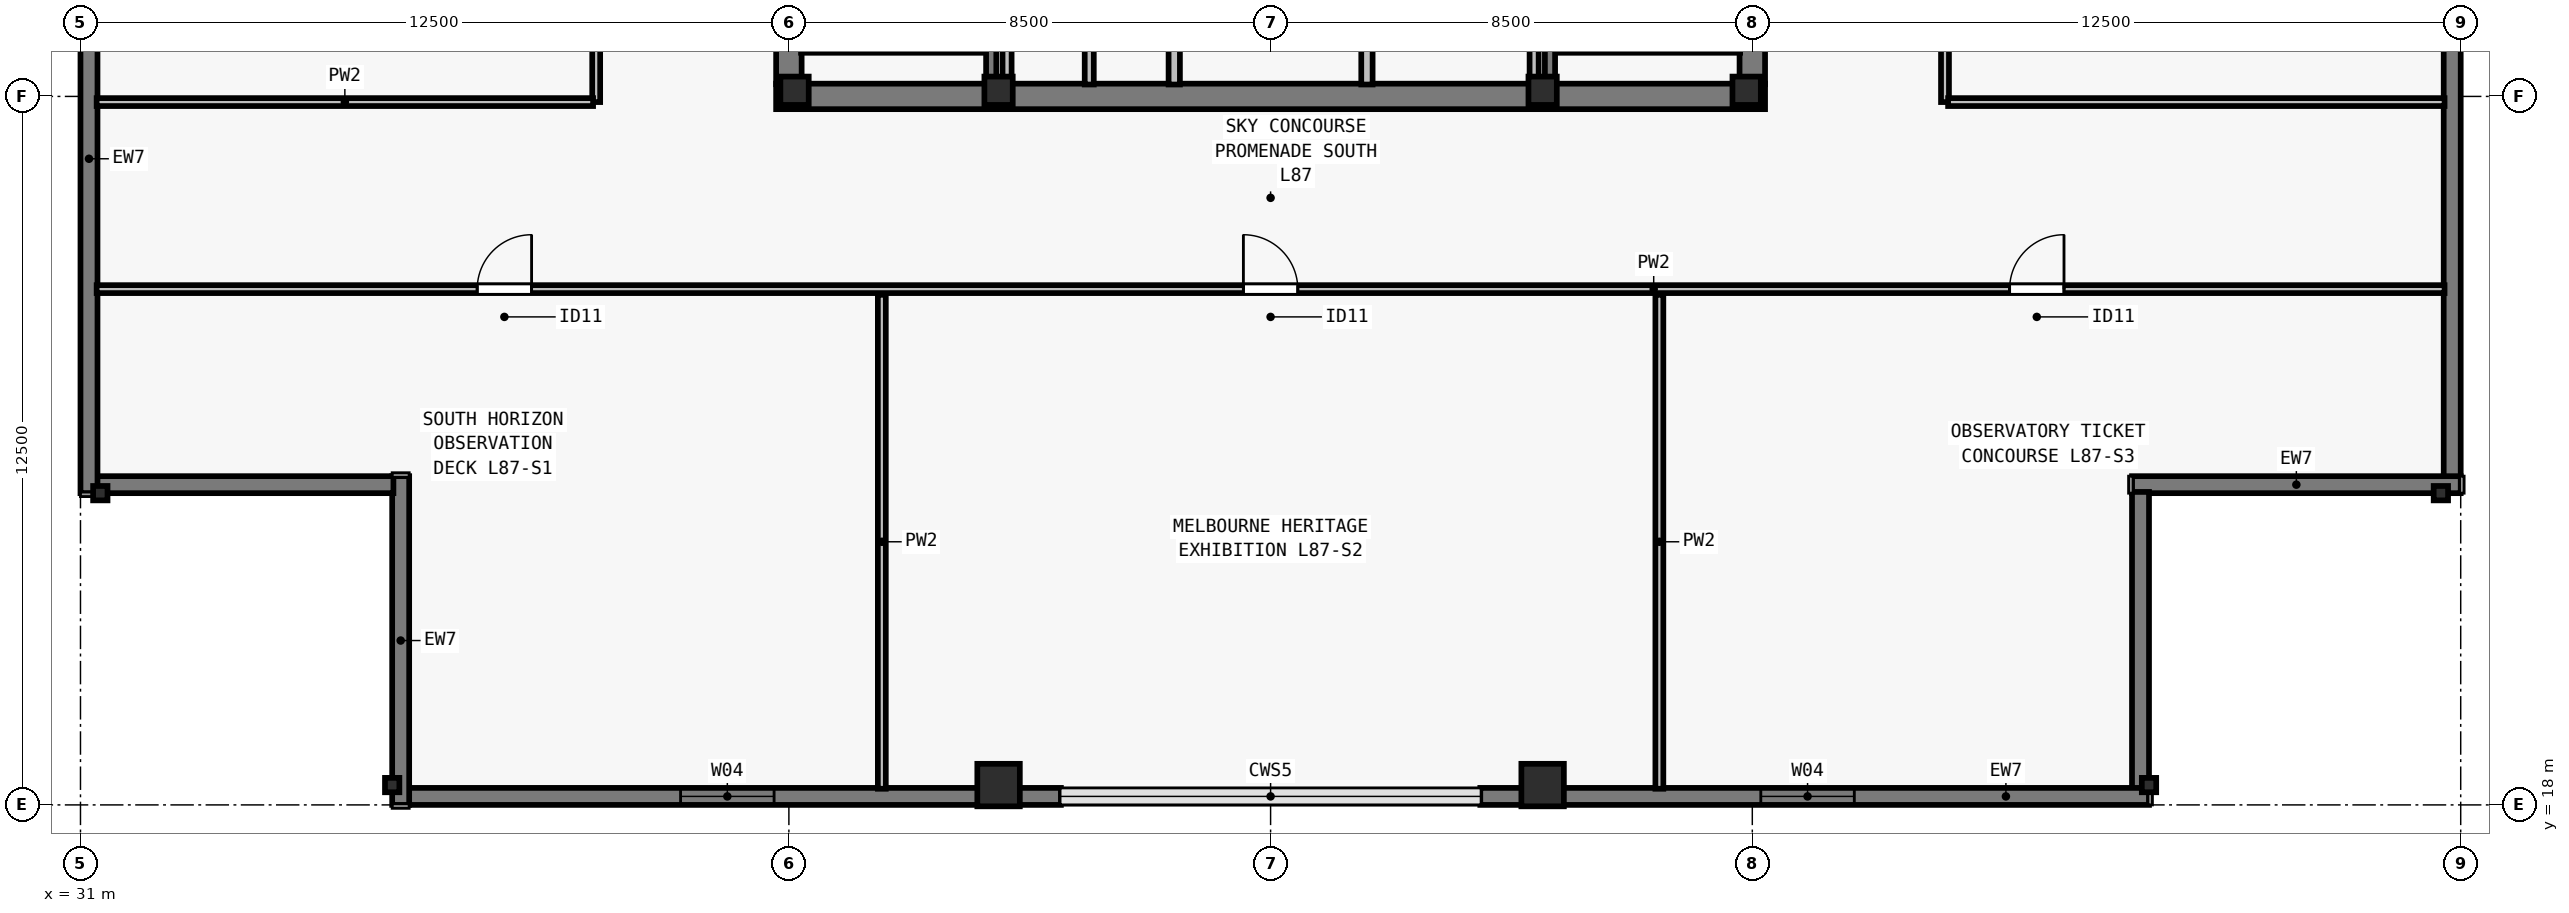
"""IFC4 building model, lengths in metres.
Left out: names, types, materials, properties, quantities, classifications, styles, units other than length and angle.
Written with IfcOpenShell. Run it as: python <this file> out.ifc"""

import sys

from ifc_helpers import new_model, si_unit, direction, frame, frame_2d, origin, origin_2d, place, context, subcontext, project, spatial, rectangle, i_section, extrude, element, fill, save


model = new_model("IFC4")
c1 = context("Model", 3, precision=1e-05, world=origin(), true_north=direction((0.0, 1.0)))
c2 = subcontext(c1, "Body", "Model", "MODEL_VIEW")
j1 = project(units=[si_unit("LENGTHUNIT", "METRE"), si_unit("PLANEANGLEUNIT", "RADIAN")], contexts=[c1])
p1 = place(None, origin())
s1 = spatial("IfcSite", under=j1, at=p1, CompositionType="ELEMENT")
p2 = place(p1, origin())
s2 = spatial("IfcBuilding", under=s1, at=p2, CompositionType="ELEMENT")
p3 = place(p2, frame((0.0, 0.0, 315.5)))
s3 = spatial("IfcBuildingStorey", under=s2, at=p3, CompositionType="ELEMENT", Elevation=315.5)
for number, where, z_axis, x_axis in (
    (1, (43.6, 30.6, 0.0), (0.0, 0.0, 1.0), (1.0, 0.0, 0.0)),
    (2, (47.2, 30.6, 0.0), (0.0, 0.0, 1.0), (1.0, 0.0, 0.0)),
    (3, (56.8, 30.6, 0.0), (0.0, 0.0, 1.0), (1.0, 0.0, 0.0)),
    (4, (60.4, 30.6, 0.0), (0.0, 0.0, 1.0), (1.0, 0.0, 0.0)),
):
    element("IfcColumn", number, at=place(p3, frame(where, z_axis=z_axis, x_axis=x_axis)), inside=s3, PredefinedType="COLUMN", context=c2, shape_type="SweptSolid", body=[
        extrude(i_section(OverallWidth=0.5, OverallDepth=0.5, WebThickness=0.028, FlangeThickness=0.045, at=origin_2d()), origin(), (0.0, 0.0, 1.0), 4.5),
    ])
p4 = place(p3, frame((36.5, 18.35, 0.0), z_axis=(0.0, 0.0, 1.0), x_axis=(1.0, 0.0, 0.0)))
e5 = element("IfcColumn", 5, at=p4, inside=s3, PredefinedType="COLUMN", context=c2, shape_type="SweptSolid", body=[
    extrude(i_section(OverallWidth=0.254, OverallDepth=0.254, WebThickness=0.009, FlangeThickness=0.014, FilletRadius=0.013, at=origin_2d()), origin(), (0.0, 0.0, 1.0), 4.5),
])
for number, where, z_axis, x_axis in (
    (6, (47.2, 18.35, 0.0), (0.0, 0.0, 1.0), (1.0, 0.0, 0.0)),
    (7, (56.8, 18.35, 0.0), (0.0, 0.0, 1.0), (1.0, 0.0, 0.0)),
):
    element("IfcColumn", number, at=place(p3, frame(where, z_axis=z_axis, x_axis=x_axis)), inside=s3, PredefinedType="COLUMN", context=c2, shape_type="SweptSolid", body=[
        extrude(rectangle(XDim=0.75, YDim=0.75, at=origin_2d()), origin(), (0.0, 0.0, 1.0), 4.5),
    ])
for number, where, z_axis, x_axis in (
    (8, (67.5, 18.35, 0.0), (0.0, 0.0, 1.0), (1.0, 0.0, 0.0)),
    (9, (72.65, 23.5, 0.0), (0.0, 0.0, 1.0), (0.0, 1.0, 0.0)),
    (10, (31.35, 23.5, 0.0), (0.0, 0.0, 1.0), (0.0, 1.0, 0.0)),
):
    element("IfcColumn", number, at=place(p3, frame(where, z_axis=z_axis, x_axis=x_axis)), inside=s3, PredefinedType="COLUMN", context=c2, shape_type="SweptSolid", body=[
        extrude(i_section(OverallWidth=0.254, OverallDepth=0.254, WebThickness=0.009, FlangeThickness=0.014, FilletRadius=0.013, at=origin_2d()), origin(), (0.0, 0.0, 1.0), 4.5),
    ])
p5 = place(p3, frame((72.85, 35.3, 0.0), z_axis=(0.0, 0.0, 1.0), x_axis=(0.0, -1.0, 0.0)))
e11 = element("IfcWall", 11, at=p5, inside=s3, PredefinedType="SOLIDWALL", context=c2, shape_type="SweptSolid", body=[
    extrude(rectangle(XDim=11.522, YDim=0.3, at=frame_2d((5.761, 0.0))), origin(), (0.0, 0.0, 1.0), 4.29),
])
p6 = place(p3, frame((73.0, 23.65, 0.0), z_axis=(0.0, 0.0, 1.0), x_axis=(-1.0, 0.0, 0.0)))
e12 = element("IfcWall", 12, at=p6, inside=s3, PredefinedType="SOLIDWALL", context=c2, shape_type="SweptSolid", body=[
    extrude(rectangle(XDim=5.8, YDim=0.3, at=frame_2d((2.9, 0.0))), origin(), (0.0, 0.0, 1.0), 4.29),
])
p7 = place(p3, frame((67.35, 23.522, 0.0), z_axis=(0.0, 0.0, 1.0), x_axis=(0.0, -1.0, 0.0)))
e13 = element("IfcWall", 13, at=p7, inside=s3, PredefinedType="SOLIDWALL", context=c2, shape_type="SweptSolid", body=[
    extrude(rectangle(XDim=5.244, YDim=0.3, at=frame_2d((2.622, 0.0))), origin(), (0.0, 0.0, 1.0), 4.29),
])
p8 = place(p3, frame((67.5, 18.15, 0.0), z_axis=(0.0, 0.0, 1.0), x_axis=(-1.0, 0.0, 0.0)))
e14 = element("IfcWall", 14, at=p8, inside=s3, PredefinedType="SOLIDWALL", context=c2, shape_type="SweptSolid", body=[
    extrude(rectangle(XDim=11.8, YDim=0.3, at=frame_2d((5.9, 0.0))), origin(), (0.0, 0.0, 1.0), 4.29),
])
p9 = place(p8, frame((5.2, 0.0, 0.8)))
e15 = element("IfcOpeningElement", 15, at=p9, cuts=e14, PredefinedType="OPENING", context=c2, shape_type="SweptSolid", body=[
    extrude(rectangle(XDim=1.65, YDim=1.85, at=frame_2d((0.825, 0.925))), frame((0.0, 0.16, 0.0), z_axis=(0.0, -1.0, 0.0), x_axis=(1.0, 0.0, 0.0)), (0.0, 0.0, 1.0), 0.32),
])
p10 = place(p3, frame((48.3, 18.15, 0.0), z_axis=(0.0, 0.0, 1.0), x_axis=(-1.0, 0.0, 0.0)))
e16 = element("IfcWall", 16, at=p10, inside=s3, PredefinedType="SOLIDWALL", context=c2, shape_type="SweptSolid", body=[
    extrude(rectangle(XDim=11.522, YDim=0.3, at=frame_2d((5.761, 0.0))), origin(), (0.0, 0.0, 1.0), 4.29),
])
p11 = place(p10, frame((5.061, 0.0, 0.8)))
e17 = element("IfcOpeningElement", 17, at=p11, cuts=e16, PredefinedType="OPENING", context=c2, shape_type="SweptSolid", body=[
    extrude(rectangle(XDim=1.65, YDim=1.85, at=frame_2d((0.825, 0.925))), frame((0.0, 0.16, 0.0), z_axis=(0.0, -1.0, 0.0), x_axis=(1.0, 0.0, 0.0)), (0.0, 0.0, 1.0), 0.32),
])
p12 = place(p3, frame((36.65, 18.0, 0.0), z_axis=(0.0, 0.0, 1.0), x_axis=(0.0, 1.0, 0.0)))
e18 = element("IfcWall", 18, at=p12, inside=s3, PredefinedType="SOLIDWALL", context=c2, shape_type="SweptSolid", body=[
    extrude(rectangle(XDim=5.8, YDim=0.3, at=frame_2d((2.9, 0.0))), origin(), (0.0, 0.0, 1.0), 4.29),
])
p13 = place(p3, frame((36.522, 23.65, 0.0), z_axis=(0.0, 0.0, 1.0), x_axis=(-1.0, 0.0, 0.0)))
e19 = element("IfcWall", 19, at=p13, inside=s3, PredefinedType="SOLIDWALL", context=c2, shape_type="SweptSolid", body=[
    extrude(rectangle(XDim=5.244, YDim=0.3, at=frame_2d((2.622, 0.0))), origin(), (0.0, 0.0, 1.0), 4.29),
])
p14 = place(p3, frame((31.15, 23.5, 0.0), z_axis=(0.0, 0.0, 1.0), x_axis=(0.0, 1.0, 0.0)))
e20 = element("IfcWall", 20, at=p14, inside=s3, PredefinedType="SOLIDWALL", context=c2, shape_type="SweptSolid", body=[
    extrude(rectangle(XDim=11.8, YDim=0.3, at=frame_2d((5.9, 0.0))), origin(), (0.0, 0.0, 1.0), 4.29),
])
p15 = place(p3, frame((43.275, 30.5, 0.0), z_axis=(0.0, 0.0, 1.0), x_axis=(1.0, 0.0, 0.0)))
e21 = element("IfcWall", 21, at=p15, inside=s3, PredefinedType="SHEAR", context=c2, shape_type="SweptSolid", body=[
    extrude(rectangle(XDim=17.45, YDim=0.45, at=frame_2d((8.725, 0.0))), origin(), (0.0, 0.0, 1.0), 4.29),
])
for number, where, z_axis, x_axis in (
    (22, (43.5, 30.715, 0.0), (0.0, 0.0, 1.0), (0.0, 1.0, 0.0)),
    (23, (60.5, 30.715, 0.0), (0.0, 0.0, 1.0), (0.0, 1.0, 0.0)),
):
    element("IfcWall", number, at=place(p3, frame(where, z_axis=z_axis, x_axis=x_axis)), inside=s3, PredefinedType="SHEAR", context=c2, shape_type="SweptSolid", body=[
        extrude(rectangle(XDim=8.035, YDim=0.45, at=frame_2d((4.018, 0.0))), origin(), (0.0, 0.0, 1.0), 4.29),
    ])
p16 = place(p3, frame((50.3, 30.71, 0.0), z_axis=(0.0, 0.0, 1.0), x_axis=(0.0, 1.0, 0.0)))
e24 = element("IfcWall", 24, at=p16, inside=s3, PredefinedType="SOLIDWALL", context=c2, shape_type="SweptSolid", body=[
    extrude(rectangle(XDim=7.905, YDim=0.2, at=frame_2d((3.953, 0.0))), origin(), (0.0, 0.0, 1.0), 4.29),
])
p17 = place(p16, frame((2.14, 0.0, 0.0)))
e25 = element("IfcOpeningElement", 25, at=p17, cuts=e24, PredefinedType="OPENING", context=c2, shape_type="SweptSolid", body=[
    extrude(rectangle(XDim=0.95, YDim=2.12, at=frame_2d((0.475, 1.06))), frame((0.0, 0.11, 0.0), z_axis=(0.0, -1.0, 0.0), x_axis=(1.0, 0.0, 0.0)), (0.0, 0.0, 1.0), 0.22),
])
p18 = place(p3, frame((53.7, 30.71, 0.0), z_axis=(0.0, 0.0, 1.0), x_axis=(0.0, 1.0, 0.0)))
e26 = element("IfcWall", 26, at=p18, inside=s3, PredefinedType="SOLIDWALL", context=c2, shape_type="SweptSolid", body=[
    extrude(rectangle(XDim=7.905, YDim=0.2, at=frame_2d((3.953, 0.0))), origin(), (0.0, 0.0, 1.0), 4.29),
])
p19 = place(p18, frame((1.39, 0.0, 0.0)))
e27 = element("IfcOpeningElement", 27, at=p19, cuts=e26, PredefinedType="OPENING", context=c2, shape_type="SweptSolid", body=[
    extrude(rectangle(XDim=0.95, YDim=2.12, at=frame_2d((0.475, 1.06))), frame((0.0, 0.11, 0.0), z_axis=(0.0, -1.0, 0.0), x_axis=(1.0, 0.0, 0.0)), (0.0, 0.0, 1.0), 0.22),
])
p20 = place(p18, frame((5.39, 0.0, 0.0)))
e28 = element("IfcOpeningElement", 28, at=p20, cuts=e26, PredefinedType="OPENING", context=c2, shape_type="SweptSolid", body=[
    extrude(rectangle(XDim=0.85, YDim=2.12, at=frame_2d((0.425, 1.06))), frame((0.0, 0.11, 0.0), z_axis=(0.0, -1.0, 0.0), x_axis=(1.0, 0.0, 0.0)), (0.0, 0.0, 1.0), 0.22),
])
p21 = place(p3, frame((47.35, 30.71, 0.0), z_axis=(0.0, 0.0, 1.0), x_axis=(0.0, 1.0, 0.0)))
e29 = element("IfcWall", 29, at=p21, inside=s3, PredefinedType="PARTITIONING", context=c2, shape_type="SweptSolid", body=[
    extrude(rectangle(XDim=7.905, YDim=0.16, at=frame_2d((3.953, 0.0))), origin(), (0.0, 0.0, 1.0), 4.29),
])
p22 = place(p3, frame((48.8, 30.71, 0.0), z_axis=(0.0, 0.0, 1.0), x_axis=(0.0, 1.0, 0.0)))
e30 = element("IfcWall", 30, at=p22, inside=s3, PredefinedType="PARTITIONING", context=c2, shape_type="SweptSolid", body=[
    extrude(rectangle(XDim=7.905, YDim=0.16, at=frame_2d((3.953, 0.0))), origin(), (0.0, 0.0, 1.0), 4.29),
])
p23 = place(p22, frame((3.54, 0.0, 0.0)))
e31 = element("IfcOpeningElement", 31, at=p23, cuts=e30, PredefinedType="OPENING", context=c2, shape_type="SweptSolid", body=[
    extrude(rectangle(XDim=0.85, YDim=2.12, at=frame_2d((0.425, 1.06))), frame((0.0, 0.09, 0.0), z_axis=(0.0, -1.0, 0.0), x_axis=(1.0, 0.0, 0.0)), (0.0, 0.0, 1.0), 0.18),
])
p24 = place(p3, frame((56.65, 30.71, 0.0), z_axis=(0.0, 0.0, 1.0), x_axis=(0.0, 1.0, 0.0)))
e32 = element("IfcWall", 32, at=p24, inside=s3, PredefinedType="PARTITIONING", context=c2, shape_type="SweptSolid", body=[
    extrude(rectangle(XDim=7.905, YDim=0.16, at=frame_2d((3.953, 0.0))), origin(), (0.0, 0.0, 1.0), 4.29),
])
p25 = place(p3, frame((31.285, 27.1, 0.0), z_axis=(0.0, 0.0, 1.0), x_axis=(1.0, 0.0, 0.0)))
e33 = element("IfcWall", 33, at=p25, inside=s3, PredefinedType="PARTITIONING", context=c2, shape_type="SweptSolid", body=[
    extrude(rectangle(XDim=41.43, YDim=0.14, at=frame_2d((20.715, 0.0))), origin(), (0.0, 0.0, 1.0), 4.009),
])
p26 = place(p25, frame((6.715, 0.0, 0.0)))
e34 = element("IfcOpeningElement", 34, at=p26, cuts=e33, PredefinedType="OPENING", context=c2, shape_type="SweptSolid", body=[
    extrude(rectangle(XDim=0.96, YDim=2.12, at=frame_2d((0.48, 1.06))), frame((0.0, 0.08, 0.0), z_axis=(0.0, -1.0, 0.0), x_axis=(1.0, 0.0, 0.0)), (0.0, 0.0, 1.0), 0.16),
])
p27 = place(p25, frame((20.235, 0.0, 0.0)))
e35 = element("IfcOpeningElement", 35, at=p27, cuts=e33, PredefinedType="OPENING", context=c2, shape_type="SweptSolid", body=[
    extrude(rectangle(XDim=0.96, YDim=2.12, at=frame_2d((0.48, 1.06))), frame((0.0, 0.08, 0.0), z_axis=(0.0, -1.0, 0.0), x_axis=(1.0, 0.0, 0.0)), (0.0, 0.0, 1.0), 0.16),
])
p28 = place(p25, frame((33.755, 0.0, 0.0)))
e36 = element("IfcOpeningElement", 36, at=p28, cuts=e33, PredefinedType="OPENING", context=c2, shape_type="SweptSolid", body=[
    extrude(rectangle(XDim=0.96, YDim=2.12, at=frame_2d((0.48, 1.06))), frame((0.0, 0.08, 0.0), z_axis=(0.0, -1.0, 0.0), x_axis=(1.0, 0.0, 0.0)), (0.0, 0.0, 1.0), 0.16),
])
p29 = place(p3, frame((40.1, 30.4, 0.0), z_axis=(0.0, 0.0, 1.0), x_axis=(0.0, 1.0, 0.0)))
e37 = element("IfcWall", 37, at=p29, inside=s3, PredefinedType="PARTITIONING", context=c2, shape_type="SweptSolid", body=[
    extrude(rectangle(XDim=17.2, YDim=0.14, at=frame_2d((8.6, 0.0))), origin(), (0.0, 0.0, 1.0), 4.009),
])
p30 = place(p29, frame((3.772, 0.0, 0.0)))
e38 = element("IfcOpeningElement", 38, at=p30, cuts=e37, PredefinedType="OPENING", context=c2, shape_type="SweptSolid", body=[
    extrude(rectangle(XDim=0.96, YDim=2.12, at=frame_2d((0.48, 1.06))), frame((0.0, 0.08, 0.0), z_axis=(0.0, -1.0, 0.0), x_axis=(1.0, 0.0, 0.0)), (0.0, 0.0, 1.0), 0.16),
])
p31 = place(p29, frame((12.272, 0.0, 0.0)))
e39 = element("IfcOpeningElement", 39, at=p31, cuts=e37, PredefinedType="OPENING", context=c2, shape_type="SweptSolid", body=[
    extrude(rectangle(XDim=0.96, YDim=2.12, at=frame_2d((0.48, 1.06))), frame((0.0, 0.08, 0.0), z_axis=(0.0, -1.0, 0.0), x_axis=(1.0, 0.0, 0.0)), (0.0, 0.0, 1.0), 0.16),
])
p32 = place(p3, frame((63.9, 30.4, 0.0), z_axis=(0.0, 0.0, 1.0), x_axis=(0.0, 1.0, 0.0)))
e40 = element("IfcWall", 40, at=p32, inside=s3, PredefinedType="PARTITIONING", context=c2, shape_type="SweptSolid", body=[
    extrude(rectangle(XDim=17.2, YDim=0.14, at=frame_2d((8.6, 0.0))), origin(), (0.0, 0.0, 1.0), 4.29),
])
p33 = place(p32, frame((3.968, 0.0, 0.0)))
e41 = element("IfcOpeningElement", 41, at=p33, cuts=e40, PredefinedType="OPENING", context=c2, shape_type="SweptSolid", body=[
    extrude(rectangle(XDim=0.96, YDim=2.12, at=frame_2d((0.48, 1.06))), frame((0.0, 0.08, 0.0), z_axis=(0.0, -1.0, 0.0), x_axis=(1.0, 0.0, 0.0)), (0.0, 0.0, 1.0), 0.16),
])
p34 = place(p32, frame((12.468, 0.0, 0.0)))
e42 = element("IfcOpeningElement", 42, at=p34, cuts=e40, PredefinedType="OPENING", context=c2, shape_type="SweptSolid", body=[
    extrude(rectangle(XDim=0.96, YDim=2.12, at=frame_2d((0.48, 1.06))), frame((0.0, 0.08, 0.0), z_axis=(0.0, -1.0, 0.0), x_axis=(1.0, 0.0, 0.0)), (0.0, 0.0, 1.0), 0.16),
])
for number, where, z_axis, x_axis in (
    (43, (31.285, 30.4, 0.0), (0.0, 0.0, 1.0), (1.0, 0.0, 0.0)),
    (44, (63.955, 30.4, 0.0), (0.0, 0.0, 1.0), (1.0, 0.0, 0.0)),
):
    element("IfcWall", number, at=place(p3, frame(where, z_axis=z_axis, x_axis=x_axis)), inside=s3, PredefinedType="PARTITIONING", context=c2, shape_type="SweptSolid", body=[
        extrude(rectangle(XDim=8.76, YDim=0.14, at=frame_2d((4.38, 0.0))), origin(), (0.0, 0.0, 1.0), 4.29),
    ])
for number, where, z_axis, x_axis in (
    (45, (45.14, 18.285, 0.0), (0.0, 0.0, 1.0), (0.0, 1.0, 0.0)),
    (46, (58.86, 18.285, 0.0), (0.0, 0.0, 1.0), (0.0, 1.0, 0.0)),
):
    element("IfcWall", number, at=place(p3, frame(where, z_axis=z_axis, x_axis=x_axis)), inside=s3, PredefinedType="PARTITIONING", context=c2, shape_type="SweptSolid", body=[
        extrude(rectangle(XDim=8.715, YDim=0.14, at=frame_2d((4.357, 0.0))), origin(), (0.0, 0.0, 1.0), 4.29),
    ])
p35 = place(p3, frame((43.715, 31.36, 0.0), z_axis=(0.0, 0.0, 1.0), x_axis=(1.0, 0.0, 0.0)))
e47 = element("IfcWall", 47, at=p35, inside=s3, PredefinedType="SOLIDWALL", context=c2, shape_type="SweptSolid", body=[
    extrude(rectangle(XDim=3.28, YDim=0.18, at=frame_2d((1.64, 0.0))), origin(), (0.0, 0.0, 1.0), 4.29),
])
p36 = place(p3, frame((47.07, 38.78, 0.0), z_axis=(0.0, 0.0, 1.0), x_axis=(0.0, -1.0, 0.0)))
e48 = element("IfcWall", 48, at=p36, inside=s3, PredefinedType="SOLIDWALL", context=c2, shape_type="SweptSolid", body=[
    extrude(rectangle(XDim=8.067, YDim=0.18, at=frame_2d((4.034, 0.0))), origin(), (0.0, 0.0, 1.0), 4.29),
])
p37 = place(p3, frame((57.005, 31.36, 0.0), z_axis=(0.0, 0.0, 1.0), x_axis=(1.0, 0.0, 0.0)))
e49 = element("IfcWall", 49, at=p37, inside=s3, PredefinedType="SOLIDWALL", context=c2, shape_type="SweptSolid", body=[
    extrude(rectangle(XDim=3.28, YDim=0.18, at=frame_2d((1.64, 0.0))), origin(), (0.0, 0.0, 1.0), 4.29),
])
p38 = place(p3, frame((56.93, 38.78, 0.0), z_axis=(0.0, 0.0, 1.0), x_axis=(0.0, -1.0, 0.0)))
e50 = element("IfcWall", 50, at=p38, inside=s3, PredefinedType="SOLIDWALL", context=c2, shape_type="SweptSolid", body=[
    extrude(rectangle(XDim=8.067, YDim=0.18, at=frame_2d((4.034, 0.0))), origin(), (0.0, 0.0, 1.0), 4.29),
])
p39 = place(p9, origin())
e51 = element("IfcWindow", 51, at=p39, inside=s3, PartitioningType="SINGLE_PANEL", PredefinedType="WINDOW", context=c2, shape_type="SweptSolid", body=[
    extrude(rectangle(XDim=1.65, YDim=1.85, at=frame_2d((0.825, 0.925))), frame((0.0, -0.04, 0.0), z_axis=(0.0, -1.0, 0.0), x_axis=(1.0, 0.0, 0.0)), (0.0, 0.0, 1.0), 0.06),
])
fill(e15, e51)
p40 = place(p11, origin())
e52 = element("IfcWindow", 52, at=p40, inside=s3, PartitioningType="SINGLE_PANEL", PredefinedType="WINDOW", context=c2, shape_type="SweptSolid", body=[
    extrude(rectangle(XDim=1.65, YDim=1.85, at=frame_2d((0.825, 0.925))), frame((0.0, -0.04, 0.0), z_axis=(0.0, -1.0, 0.0), x_axis=(1.0, 0.0, 0.0)), (0.0, 0.0, 1.0), 0.06),
])
fill(e17, e52)
p41 = place(p26, origin())
e53 = element("IfcDoor", 53, at=p41, inside=s3, OperationType="SINGLE_SWING_RIGHT", PredefinedType="DOOR", context=c2, shape_type="SweptSolid", body=[
    extrude(rectangle(XDim=0.96, YDim=2.12, at=frame_2d((0.48, 1.06))), frame((0.0, 0.025, 0.0), z_axis=(0.0, -1.0, 0.0), x_axis=(1.0, 0.0, 0.0)), (0.0, 0.0, 1.0), 0.05),
])
fill(e34, e53)
p42 = place(p27, origin())
e54 = element("IfcDoor", 54, at=p42, inside=s3, OperationType="SINGLE_SWING_LEFT", PredefinedType="DOOR", context=c2, shape_type="SweptSolid", body=[
    extrude(rectangle(XDim=0.96, YDim=2.12, at=frame_2d((0.48, 1.06))), frame((0.0, 0.025, 0.0), z_axis=(0.0, -1.0, 0.0), x_axis=(1.0, 0.0, 0.0)), (0.0, 0.0, 1.0), 0.05),
])
fill(e35, e54)
p43 = place(p28, origin())
e55 = element("IfcDoor", 55, at=p43, inside=s3, OperationType="SINGLE_SWING_RIGHT", PredefinedType="DOOR", context=c2, shape_type="SweptSolid", body=[
    extrude(rectangle(XDim=0.96, YDim=2.12, at=frame_2d((0.48, 1.06))), frame((0.0, 0.025, 0.0), z_axis=(0.0, -1.0, 0.0), x_axis=(1.0, 0.0, 0.0)), (0.0, 0.0, 1.0), 0.05),
])
fill(e36, e55)
save(model, sys.argv[1])
